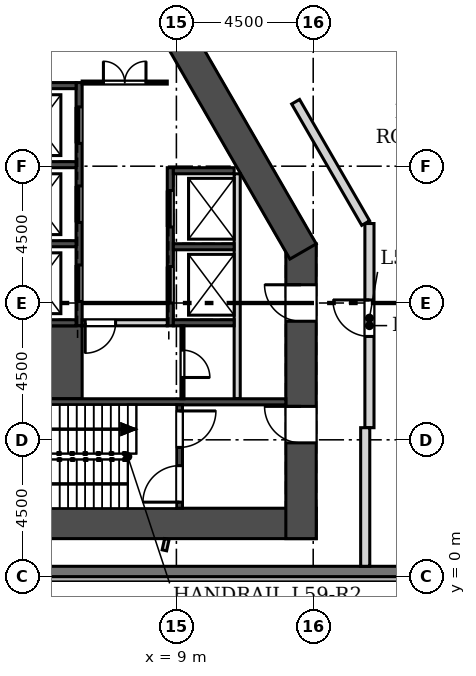
"""IFC4 building model, lengths in metres.
Left out: names, types, materials, properties, quantities, classifications, styles, units other than length and angle.
Written with IfcOpenShell. Run it as: python <this file> out.ifc"""

import sys

from ifc_helpers import new_model, si_unit, direction, frame, frame_2d, origin, place, context, subcontext, project, spatial, rectangle, extrude, element, fill, save


model = new_model("IFC4")
c1 = context("Model", 3, precision=1e-05, world=origin(), true_north=direction((0.0, 1.0)))
c2 = subcontext(c1, "Body", "Model", "MODEL_VIEW")
j1 = project(units=[si_unit("LENGTHUNIT", "METRE"), si_unit("PLANEANGLEUNIT", "RADIAN")], contexts=[c1])
p1 = place(None, origin())
s1 = spatial("IfcSite", under=j1, at=p1, CompositionType="ELEMENT")
p2 = place(p1, origin())
s2 = spatial("IfcBuilding", under=s1, at=p2, CompositionType="ELEMENT")
p3 = place(p2, frame((0.0, 0.0, 259.5)))
s3 = spatial("IfcBuildingStorey", under=s2, at=p3, CompositionType="ELEMENT", Elevation=259.5)
p4 = place(p3, frame((-13.6, 1.75, 0.0), z_axis=(0.0, 0.0, 1.0), x_axis=(1.0, 0.0, 0.0)))
e1 = element("IfcWall", 1, at=p4, inside=s3, PredefinedType="SHEAR", context=c2, shape_type="SweptSolid", body=[
    extrude(rectangle(XDim=27.2, YDim=1.0, at=frame_2d((13.6, 0.0))), origin(), (0.0, 0.0, 1.0), 7.2),
])
p5 = place(p3, frame((13.1, 1.25, 0.0), z_axis=(0.0, 0.0, 1.0), x_axis=(0.0, 1.0, 0.0)))
e2 = element("IfcWall", 2, at=p5, inside=s3, PredefinedType="SHEAR", context=c2, shape_type="SweptSolid", body=[
    extrude(rectangle(XDim=9.695, YDim=1.0, at=frame_2d((4.848, 0.0))), origin(), (0.0, 0.0, 1.0), 7.2),
])
p6 = place(p5, frame((3.15, 0.0, 0.0)))
e3 = element("IfcOpeningElement", 3, at=p6, cuts=e2, PredefinedType="OPENING", context=c2, shape_type="SweptSolid", body=[
    extrude(rectangle(XDim=1.2, YDim=2.1, at=frame_2d((0.6, 1.05))), frame((0.0, 0.51, 0.0), z_axis=(0.0, -1.0, 0.0), x_axis=(1.0, 0.0, 0.0)), (0.0, 0.0, 1.0), 1.02),
])
p7 = place(p5, frame((7.15, 0.0, 0.0)))
e4 = element("IfcOpeningElement", 4, at=p7, cuts=e2, PredefinedType="OPENING", context=c2, shape_type="SweptSolid", body=[
    extrude(rectangle(XDim=1.2, YDim=2.1, at=frame_2d((0.6, 1.05))), frame((0.0, 0.51, 0.0), z_axis=(0.0, -1.0, 0.0), x_axis=(1.0, 0.0, 0.0)), (0.0, 0.0, 1.0), 1.02),
])
p8 = place(p3, frame((13.167, 10.695, 0.0), z_axis=(0.0, 0.0, 1.0), x_axis=(-0.499995021168, 0.866028278295, 0.0)))
e5 = element("IfcWall", 5, at=p8, inside=s3, PredefinedType="SHEAR", context=c2, shape_type="SweptSolid", body=[
    extrude(rectangle(XDim=8.839, YDim=1.0, at=frame_2d((4.419, 0.0))), origin(), (0.0, 0.0, 1.0), 7.2),
])
p9 = place(p3, frame((-21.669, 0.17, 0.0), z_axis=(0.0, 0.0, 1.0), x_axis=(1.0, 0.0, 0.0)))
e6 = element("IfcWall", 6, at=p9, inside=s3, PredefinedType="SOLIDWALL", context=c2, shape_type="SweptSolid", body=[
    extrude(rectangle(XDim=43.339, YDim=0.34, at=frame_2d((21.669, 0.0))), origin(), (0.0, 0.0, 1.0), 6.8),
])
p10 = place(p3, frame((26.022, 7.709, 0.0), z_axis=(0.0, 0.0, 1.0), x_axis=(-0.500000891752, 0.866024888931, 0.0)))
e7 = element("IfcWall", 7, at=p10, inside=s3, PredefinedType="SOLIDWALL", context=c2, shape_type="SweptSolid", body=[
    extrude(rectangle(XDim=43.339, YDim=0.34, at=frame_2d((21.669, 0.0))), origin(), (0.0, 0.0, 1.0), 6.8),
])
p11 = place(p10, frame((19.335, 0.0, 0.9)))
e8 = element("IfcOpeningElement", 8, at=p11, cuts=e7, PredefinedType="OPENING", context=c2, shape_type="SweptSolid", body=[
    extrude(rectangle(XDim=1.885, YDim=3.0, at=frame_2d((0.942, 1.5))), frame((0.0, 0.18, 0.0), z_axis=(0.0, -1.0, 0.0), x_axis=(1.0, 0.0, 0.0)), (0.0, 0.0, 1.0), 0.36),
])
p12 = place(p10, frame((34.335, 0.0, 0.9)))
e9 = element("IfcOpeningElement", 9, at=p12, cuts=e7, PredefinedType="OPENING", context=c2, shape_type="SweptSolid", body=[
    extrude(rectangle(XDim=1.885, YDim=3.0, at=frame_2d((0.942, 1.5))), frame((0.0, 0.18, 0.0), z_axis=(0.0, -1.0, 0.0), x_axis=(1.0, 0.0, 0.0)), (0.0, 0.0, 1.0), 0.36),
])
p13 = place(p10, frame((40.335, 0.0, 0.9)))
e10 = element("IfcOpeningElement", 10, at=p13, cuts=e7, PredefinedType="OPENING", context=c2, shape_type="SweptSolid", body=[
    extrude(rectangle(XDim=1.885, YDim=3.0, at=frame_2d((0.942, 1.5))), frame((0.0, 0.18, 0.0), z_axis=(0.0, -1.0, 0.0), x_axis=(1.0, 0.0, 0.0)), (0.0, 0.0, 1.0), 0.36),
])
p14 = place(p3, frame((11.0, 5.85, 0.0), z_axis=(0.0, 0.0, 1.0), x_axis=(0.0, 1.0, 0.0)))
e11 = element("IfcWall", 11, at=p14, inside=s3, PredefinedType="SOLIDWALL", context=c2, shape_type="SweptSolid", body=[
    extrude(rectangle(XDim=7.4, YDim=0.2, at=frame_2d((3.7, 0.0))), origin(), (0.0, 0.0, 1.0), 6.8),
])
p15 = place(p3, frame((8.8, 8.25, -0.4), z_axis=(0.0, 0.0, 1.0), x_axis=(0.0, 1.0, 0.0)))
e12 = element("IfcWall", 12, at=p15, inside=s3, PredefinedType="SOLIDWALL", context=c2, shape_type="SweptSolid", body=[
    extrude(rectangle(XDim=5.2, YDim=0.2, at=frame_2d((2.6, 0.0))), origin(), (0.0, 0.0, 1.0), 7.2),
])
p16 = place(p15, frame((0.75, 0.0, 0.4)))
e13 = element("IfcOpeningElement", 13, at=p16, cuts=e12, PredefinedType="OPENING", context=c2, shape_type="SweptSolid", body=[
    extrude(rectangle(XDim=1.2, YDim=2.1, at=frame_2d((0.6, 1.05))), frame((0.0, 0.11, 0.0), z_axis=(0.0, -1.0, 0.0), x_axis=(1.0, 0.0, 0.0)), (0.0, 0.0, 1.0), 0.22),
])
p17 = place(p15, frame((3.25, 0.0, 0.4)))
e14 = element("IfcOpeningElement", 14, at=p17, cuts=e12, PredefinedType="OPENING", context=c2, shape_type="SweptSolid", body=[
    extrude(rectangle(XDim=1.2, YDim=2.1, at=frame_2d((0.6, 1.05))), frame((0.0, 0.11, 0.0), z_axis=(0.0, -1.0, 0.0), x_axis=(1.0, 0.0, 0.0)), (0.0, 0.0, 1.0), 0.22),
])
p18 = place(p3, frame((5.8, 8.25, -0.4), z_axis=(0.0, 0.0, 1.0), x_axis=(0.0, 1.0, 0.0)))
e15 = element("IfcWall", 15, at=p18, inside=s3, PredefinedType="SOLIDWALL", context=c2, shape_type="SweptSolid", body=[
    extrude(rectangle(XDim=8.0, YDim=0.2, at=frame_2d((4.0, 0.0))), origin(), (0.0, 0.0, 1.0), 7.2),
])
p19 = place(p18, frame((0.8, 0.0, 0.4)))
e16 = element("IfcOpeningElement", 16, at=p19, cuts=e15, PredefinedType="OPENING", context=c2, shape_type="SweptSolid", body=[
    extrude(rectangle(XDim=1.2, YDim=2.1, at=frame_2d((0.6, 1.05))), frame((0.0, 0.11, 0.0), z_axis=(0.0, -1.0, 0.0), x_axis=(1.0, 0.0, 0.0)), (0.0, 0.0, 1.0), 0.22),
])
p20 = place(p18, frame((3.4, 0.0, 0.4)))
e17 = element("IfcOpeningElement", 17, at=p20, cuts=e15, PredefinedType="OPENING", context=c2, shape_type="SweptSolid", body=[
    extrude(rectangle(XDim=1.2, YDim=2.1, at=frame_2d((0.6, 1.05))), frame((0.0, 0.11, 0.0), z_axis=(0.0, -1.0, 0.0), x_axis=(1.0, 0.0, 0.0)), (0.0, 0.0, 1.0), 0.22),
])
p21 = place(p18, frame((6.0, 0.0, 0.4)))
e18 = element("IfcOpeningElement", 18, at=p21, cuts=e15, PredefinedType="OPENING", context=c2, shape_type="SweptSolid", body=[
    extrude(rectangle(XDim=1.2, YDim=2.1, at=frame_2d((0.6, 1.05))), frame((0.0, 0.11, 0.0), z_axis=(0.0, -1.0, 0.0), x_axis=(1.0, 0.0, 0.0)), (0.0, 0.0, 1.0), 0.22),
])
p22 = place(p3, frame((5.2, 5.85, -0.4), z_axis=(0.0, 0.0, 1.0), x_axis=(0.0, 1.0, 0.0)))
e19 = element("IfcWall", 19, at=p22, inside=s3, PredefinedType="SOLIDWALL", context=c2, shape_type="SweptSolid", body=[
    extrude(rectangle(XDim=2.4, YDim=1.4, at=frame_2d((1.2, 0.0))), origin(), (0.0, 0.0, 1.0), 7.2),
])
p23 = place(p3, frame((8.9, 8.35, -0.4), z_axis=(0.0, 0.0, 1.0), x_axis=(1.0, 0.0, 0.0)))
e20 = element("IfcWall", 20, at=p23, inside=s3, PredefinedType="SOLIDWALL", context=c2, shape_type="SweptSolid", body=[
    extrude(rectangle(XDim=2.0, YDim=0.2, at=frame_2d((1.0, 0.0))), origin(), (0.0, 0.0, 1.0), 7.2),
])
p24 = place(p3, frame((1.5, 8.35, -0.4), z_axis=(0.0, 0.0, 1.0), x_axis=(1.0, 0.0, 0.0)))
e21 = element("IfcWall", 21, at=p24, inside=s3, PredefinedType="SOLIDWALL", context=c2, shape_type="SweptSolid", body=[
    extrude(rectangle(XDim=4.2, YDim=0.2, at=frame_2d((2.1, 0.0))), origin(), (0.0, 0.0, 1.0), 7.2),
])
p25 = place(p3, frame((1.2, 5.75, -0.4), z_axis=(0.0, 0.0, 1.0), x_axis=(1.0, 0.0, 0.0)))
e22 = element("IfcWall", 22, at=p25, inside=s3, PredefinedType="SOLIDWALL", context=c2, shape_type="SweptSolid", body=[
    extrude(rectangle(XDim=11.4, YDim=0.2, at=frame_2d((5.7, 0.0))), origin(), (0.0, 0.0, 1.0), 7.2),
])
p26 = place(p3, frame((9.1, 2.25, -0.4), z_axis=(0.0, 0.0, 1.0), x_axis=(0.0, 1.0, 0.0)))
e23 = element("IfcWall", 23, at=p26, inside=s3, PredefinedType="SOLIDWALL", context=c2, shape_type="SweptSolid", body=[
    extrude(rectangle(XDim=3.4, YDim=0.2, at=frame_2d((1.7, 0.0))), origin(), (0.0, 0.0, 1.0), 7.2),
])
p27 = place(p26, frame((0.2, 0.0, 0.4)))
e24 = element("IfcOpeningElement", 24, at=p27, cuts=e23, PredefinedType="OPENING", context=c2, shape_type="SweptSolid", body=[
    extrude(rectangle(XDim=1.2, YDim=2.1, at=frame_2d((0.6, 1.05))), frame((0.0, 0.11, 0.0), z_axis=(0.0, -1.0, 0.0), x_axis=(1.0, 0.0, 0.0)), (0.0, 0.0, 1.0), 0.22),
])
p28 = place(p26, frame((2.0, 0.0, 0.4)))
e25 = element("IfcOpeningElement", 25, at=p28, cuts=e23, PredefinedType="OPENING", context=c2, shape_type="SweptSolid", body=[
    extrude(rectangle(XDim=1.2, YDim=2.1, at=frame_2d((0.6, 1.05))), frame((0.0, 0.11, 0.0), z_axis=(0.0, -1.0, 0.0), x_axis=(1.0, 0.0, 0.0)), (0.0, 0.0, 1.0), 0.22),
])
for number, where, z_axis, x_axis in (
    (26, (8.9, 10.85, -0.4), (0.0, 0.0, 1.0), (1.0, 0.0, 0.0)),
    (27, (8.9, 13.35, -0.4), (0.0, 0.0, 1.0), (1.0, 0.0, 0.0)),
    (28, (3.7, 10.95, -0.4), (0.0, 0.0, 1.0), (1.0, 0.0, 0.0)),
    (29, (3.7, 13.55, -0.4), (0.0, 0.0, 1.0), (1.0, 0.0, 0.0)),
    (30, (3.7, 16.15, -0.4), (0.0, 0.0, 1.0), (1.0, 0.0, 0.0)),
):
    element("IfcWall", number, at=place(p3, frame(where, z_axis=z_axis, x_axis=x_axis)), inside=s3, PredefinedType="SOLIDWALL", context=c2, shape_type="SweptSolid", body=[
        extrude(rectangle(XDim=2.0, YDim=0.2, at=frame_2d((1.0, 0.0))), origin(), (0.0, 0.0, 1.0), 7.2),
    ])
p29 = place(p3, frame((5.9, 16.25, 0.0), z_axis=(0.0, 0.0, 1.0), x_axis=(1.0, 0.0, 0.0)))
e31 = element("IfcWall", 31, at=p29, inside=s3, PredefinedType="PARTITIONING", context=c2, shape_type="SweptSolid", body=[
    extrude(rectangle(XDim=2.8, YDim=0.1, at=frame_2d((1.4, 0.0))), origin(), (0.0, 0.0, 1.0), 6.8),
])
p30 = place(p29, frame((0.7, 0.0, 0.0)))
e32 = element("IfcOpeningElement", 32, at=p30, cuts=e31, PredefinedType="OPENING", context=c2, shape_type="SweptSolid", body=[
    extrude(rectangle(XDim=1.4, YDim=2.1, at=frame_2d((0.7, 1.05))), frame((0.0, 0.06, 0.0), z_axis=(0.0, -1.0, 0.0), x_axis=(1.0, 0.0, 0.0)), (0.0, 0.0, 1.0), 0.12),
])
p31 = place(p3, frame((9.2, 5.85, 0.0), z_axis=(0.0, 0.0, 1.0), x_axis=(0.0, 1.0, 0.0)))
e33 = element("IfcWall", 33, at=p31, inside=s3, PredefinedType="PARTITIONING", context=c2, shape_type="SweptSolid", body=[
    extrude(rectangle(XDim=2.4, YDim=0.1, at=frame_2d((1.2, 0.0))), origin(), (0.0, 0.0, 1.0), 6.8),
])
p32 = place(p31, frame((0.7, 0.0, 0.0)))
e34 = element("IfcOpeningElement", 34, at=p32, cuts=e33, PredefinedType="OPENING", context=c2, shape_type="SweptSolid", body=[
    extrude(rectangle(XDim=0.9, YDim=2.1, at=frame_2d((0.45, 1.05))), frame((0.0, 0.06, 0.0), z_axis=(0.0, -1.0, 0.0), x_axis=(1.0, 0.0, 0.0)), (0.0, 0.0, 1.0), 0.12),
])
p33 = place(p3, frame((5.9, 8.35, 0.0), z_axis=(0.0, 0.0, 1.0), x_axis=(1.0, 0.0, 0.0)))
e35 = element("IfcWall", 35, at=p33, inside=s3, PredefinedType="SOLIDWALL", context=c2, shape_type="SweptSolid", body=[
    extrude(rectangle(XDim=2.8, YDim=0.2, at=frame_2d((1.4, 0.0))), origin(), (0.0, 0.0, 1.0), 6.8),
])
p34 = place(p33, frame((0.1, 0.0, 0.0)))
e36 = element("IfcOpeningElement", 36, at=p34, cuts=e35, PredefinedType="OPENING", context=c2, shape_type="SweptSolid", body=[
    extrude(rectangle(XDim=1.0, YDim=2.1, at=frame_2d((0.5, 1.05))), frame((0.0, 0.11, 0.0), z_axis=(0.0, -1.0, 0.0), x_axis=(1.0, 0.0, 0.0)), (0.0, 0.0, 1.0), 0.22),
])
p35 = place(p3, frame((7.4, 3.95, 0.0), z_axis=(0.0, 0.0, 1.0), x_axis=(1.0, 0.0, 0.0)))
e37 = element("IfcWall", 37, at=p35, inside=s3, PredefinedType="SOLIDWALL", context=c2, shape_type="SweptSolid", body=[
    extrude(rectangle(XDim=1.6, YDim=0.2, at=frame_2d((0.8, 0.0))), origin(), (0.0, 0.0, 1.0), 6.8),
])
p36 = place(p3, frame((15.35, 11.614, 0.0), z_axis=(0.0, 0.0, 1.0), x_axis=(0.0, -1.0, 0.0)))
e38 = element("IfcWall", 38, at=p36, inside=s3, PredefinedType="SOLIDWALL", context=c2, shape_type="SweptSolid", body=[
    extrude(rectangle(XDim=6.715, YDim=0.3, at=frame_2d((3.357, 0.0))), origin(), (0.0, 0.0, 1.0), 6.8),
])
p37 = place(p36, frame((2.514, 0.0, 0.0)))
e39 = element("IfcOpeningElement", 39, at=p37, cuts=e38, PredefinedType="OPENING", context=c2, shape_type="SweptSolid", body=[
    extrude(rectangle(XDim=1.2, YDim=2.1, at=frame_2d((0.6, 1.05))), frame((0.0, 0.16, 0.0), z_axis=(0.0, -1.0, 0.0), x_axis=(1.0, 0.0, 0.0)), (0.0, 0.0, 1.0), 0.32),
])
p38 = place(p3, frame((12.922, 15.62, 0.0), z_axis=(0.0, 0.0, 1.0), x_axis=(0.49997925212, -0.866037382247, 0.0)))
e40 = element("IfcWall", 40, at=p38, inside=s3, PredefinedType="SOLIDWALL", context=c2, shape_type="SweptSolid", body=[
    extrude(rectangle(XDim=4.609, YDim=0.3, at=frame_2d((2.304, 0.0))), origin(), (0.0, 0.0, 1.0), 6.8),
])
p39 = place(p3, frame((15.211, 4.899, 0.0), z_axis=(0.0, 0.0, 1.0), x_axis=(0.0, -1.0, 0.0)))
e41 = element("IfcWall", 41, at=p39, inside=s3, PredefinedType="SOLIDWALL", context=c2, shape_type="SweptSolid", body=[
    extrude(rectangle(XDim=4.559, YDim=0.3, at=frame_2d((2.279, 0.0))), origin(), (0.0, 0.0, 1.0), 6.8),
])
p40 = place(p3, frame((8.686, 1.234, 0.0), z_axis=(0.0, 0.0, 1.0), x_axis=(-0.214527942231, -0.976717851788, 0.0)))
e42 = element("IfcWall", 42, at=p40, inside=s3, PredefinedType="PARTITIONING", context=c2, shape_type="SweptSolid", body=[
    extrude(rectangle(XDim=0.377, YDim=0.15, at=frame_2d((0.188, 0.0))), origin(), (0.0, 0.0, 1.0), 6.8),
])
p41 = place(p16, origin())
e43 = element("IfcDoor", 43, at=p41, inside=s3, OperationType="SLIDING_TO_LEFT", PredefinedType="DOOR", context=c2, shape_type="SweptSolid", body=[
    extrude(rectangle(XDim=1.2, YDim=2.1, at=frame_2d((0.6, 1.05))), frame((0.0, 0.025, 0.0), z_axis=(0.0, -1.0, 0.0), x_axis=(1.0, 0.0, 0.0)), (0.0, 0.0, 1.0), 0.05),
])
fill(e13, e43)
p42 = place(p17, origin())
e44 = element("IfcDoor", 44, at=p42, inside=s3, OperationType="SLIDING_TO_LEFT", PredefinedType="DOOR", context=c2, shape_type="SweptSolid", body=[
    extrude(rectangle(XDim=1.2, YDim=2.1, at=frame_2d((0.6, 1.05))), frame((0.0, 0.025, 0.0), z_axis=(0.0, -1.0, 0.0), x_axis=(1.0, 0.0, 0.0)), (0.0, 0.0, 1.0), 0.05),
])
fill(e14, e44)
p43 = place(p19, origin())
e45 = element("IfcDoor", 45, at=p43, inside=s3, OperationType="SLIDING_TO_LEFT", PredefinedType="DOOR", context=c2, shape_type="SweptSolid", body=[
    extrude(rectangle(XDim=1.2, YDim=2.1, at=frame_2d((0.6, 1.05))), frame((0.0, 0.025, 0.0), z_axis=(0.0, -1.0, 0.0), x_axis=(1.0, 0.0, 0.0)), (0.0, 0.0, 1.0), 0.05),
])
fill(e16, e45)
p44 = place(p20, origin())
e46 = element("IfcDoor", 46, at=p44, inside=s3, OperationType="SLIDING_TO_LEFT", PredefinedType="DOOR", context=c2, shape_type="SweptSolid", body=[
    extrude(rectangle(XDim=1.2, YDim=2.1, at=frame_2d((0.6, 1.05))), frame((0.0, 0.025, 0.0), z_axis=(0.0, -1.0, 0.0), x_axis=(1.0, 0.0, 0.0)), (0.0, 0.0, 1.0), 0.05),
])
fill(e17, e46)
p45 = place(p21, origin())
e47 = element("IfcDoor", 47, at=p45, inside=s3, OperationType="SLIDING_TO_LEFT", PredefinedType="DOOR", context=c2, shape_type="SweptSolid", body=[
    extrude(rectangle(XDim=1.2, YDim=2.1, at=frame_2d((0.6, 1.05))), frame((0.0, 0.025, 0.0), z_axis=(0.0, -1.0, 0.0), x_axis=(1.0, 0.0, 0.0)), (0.0, 0.0, 1.0), 0.05),
])
fill(e18, e47)
p46 = place(p30, origin())
e48 = element("IfcDoor", 48, at=p46, inside=s3, OperationType="DOUBLE_DOOR_SINGLE_SWING", PredefinedType="DOOR", context=c2, shape_type="SweptSolid", body=[
    extrude(rectangle(XDim=1.4, YDim=2.1, at=frame_2d((0.7, 1.05))), frame((0.0, 0.025, 0.0), z_axis=(0.0, -1.0, 0.0), x_axis=(1.0, 0.0, 0.0)), (0.0, 0.0, 1.0), 0.05),
])
fill(e32, e48)
p47 = place(p34, frame((1.0, 0.0, 0.0), z_axis=(0.0, 0.0, 1.0), x_axis=(-1.0, 0.0, 0.0)))
e49 = element("IfcDoor", 49, at=p47, inside=s3, OperationType="SINGLE_SWING_RIGHT", PredefinedType="DOOR", context=c2, shape_type="SweptSolid", body=[
    extrude(rectangle(XDim=1.0, YDim=2.1, at=frame_2d((0.5, 1.05))), frame((0.0, 0.025, 0.0), z_axis=(0.0, -1.0, 0.0), x_axis=(1.0, 0.0, 0.0)), (0.0, 0.0, 1.0), 0.05),
])
fill(e36, e49)
p48 = place(p32, frame((0.9, 0.0, 0.0), z_axis=(0.0, 0.0, 1.0), x_axis=(-1.0, 0.0, 0.0)))
e50 = element("IfcDoor", 50, at=p48, inside=s3, OperationType="SINGLE_SWING_RIGHT", PredefinedType="DOOR", context=c2, shape_type="SweptSolid", body=[
    extrude(rectangle(XDim=0.9, YDim=2.1, at=frame_2d((0.45, 1.05))), frame((0.0, 0.025, 0.0), z_axis=(0.0, -1.0, 0.0), x_axis=(1.0, 0.0, 0.0)), (0.0, 0.0, 1.0), 0.05),
])
fill(e34, e50)
p49 = place(p6, origin())
e51 = element("IfcDoor", 51, at=p49, inside=s3, OperationType="SINGLE_SWING_RIGHT", PredefinedType="DOOR", context=c2, shape_type="SweptSolid", body=[
    extrude(rectangle(XDim=1.2, YDim=2.1, at=frame_2d((0.6, 1.05))), frame((0.0, 0.025, 0.0), z_axis=(0.0, -1.0, 0.0), x_axis=(1.0, 0.0, 0.0)), (0.0, 0.0, 1.0), 0.05),
])
fill(e3, e51)
p50 = place(p27, origin())
e52 = element("IfcDoor", 52, at=p50, inside=s3, OperationType="SINGLE_SWING_LEFT", PredefinedType="DOOR", context=c2, shape_type="SweptSolid", body=[
    extrude(rectangle(XDim=1.2, YDim=2.1, at=frame_2d((0.6, 1.05))), frame((0.0, 0.025, 0.0), z_axis=(0.0, -1.0, 0.0), x_axis=(1.0, 0.0, 0.0)), (0.0, 0.0, 1.0), 0.05),
])
fill(e24, e52)
p51 = place(p7, origin())
e53 = element("IfcDoor", 53, at=p51, inside=s3, OperationType="SINGLE_SWING_RIGHT", PredefinedType="DOOR", context=c2, shape_type="SweptSolid", body=[
    extrude(rectangle(XDim=1.2, YDim=2.1, at=frame_2d((0.6, 1.05))), frame((0.0, 0.025, 0.0), z_axis=(0.0, -1.0, 0.0), x_axis=(1.0, 0.0, 0.0)), (0.0, 0.0, 1.0), 0.05),
])
fill(e4, e53)
p52 = place(p28, frame((1.2, 0.0, 0.0), z_axis=(0.0, 0.0, 1.0), x_axis=(-1.0, 0.0, 0.0)))
e54 = element("IfcDoor", 54, at=p52, inside=s3, OperationType="SINGLE_SWING_LEFT", PredefinedType="DOOR", context=c2, shape_type="SweptSolid", body=[
    extrude(rectangle(XDim=1.2, YDim=2.1, at=frame_2d((0.6, 1.05))), frame((0.0, 0.025, 0.0), z_axis=(0.0, -1.0, 0.0), x_axis=(1.0, 0.0, 0.0)), (0.0, 0.0, 1.0), 0.05),
])
fill(e25, e54)
p53 = place(p37, frame((1.2, 0.0, 0.0), z_axis=(0.0, 0.0, 1.0), x_axis=(-1.0, 0.0, 0.0)))
e55 = element("IfcDoor", 55, at=p53, inside=s3, OperationType="SINGLE_SWING_RIGHT", PredefinedType="DOOR", context=c2, shape_type="SweptSolid", body=[
    extrude(rectangle(XDim=1.2, YDim=2.1, at=frame_2d((0.6, 1.05))), frame((0.0, 0.025, 0.0), z_axis=(0.0, -1.0, 0.0), x_axis=(1.0, 0.0, 0.0)), (0.0, 0.0, 1.0), 0.05),
])
fill(e39, e55)
save(model, sys.argv[1])
